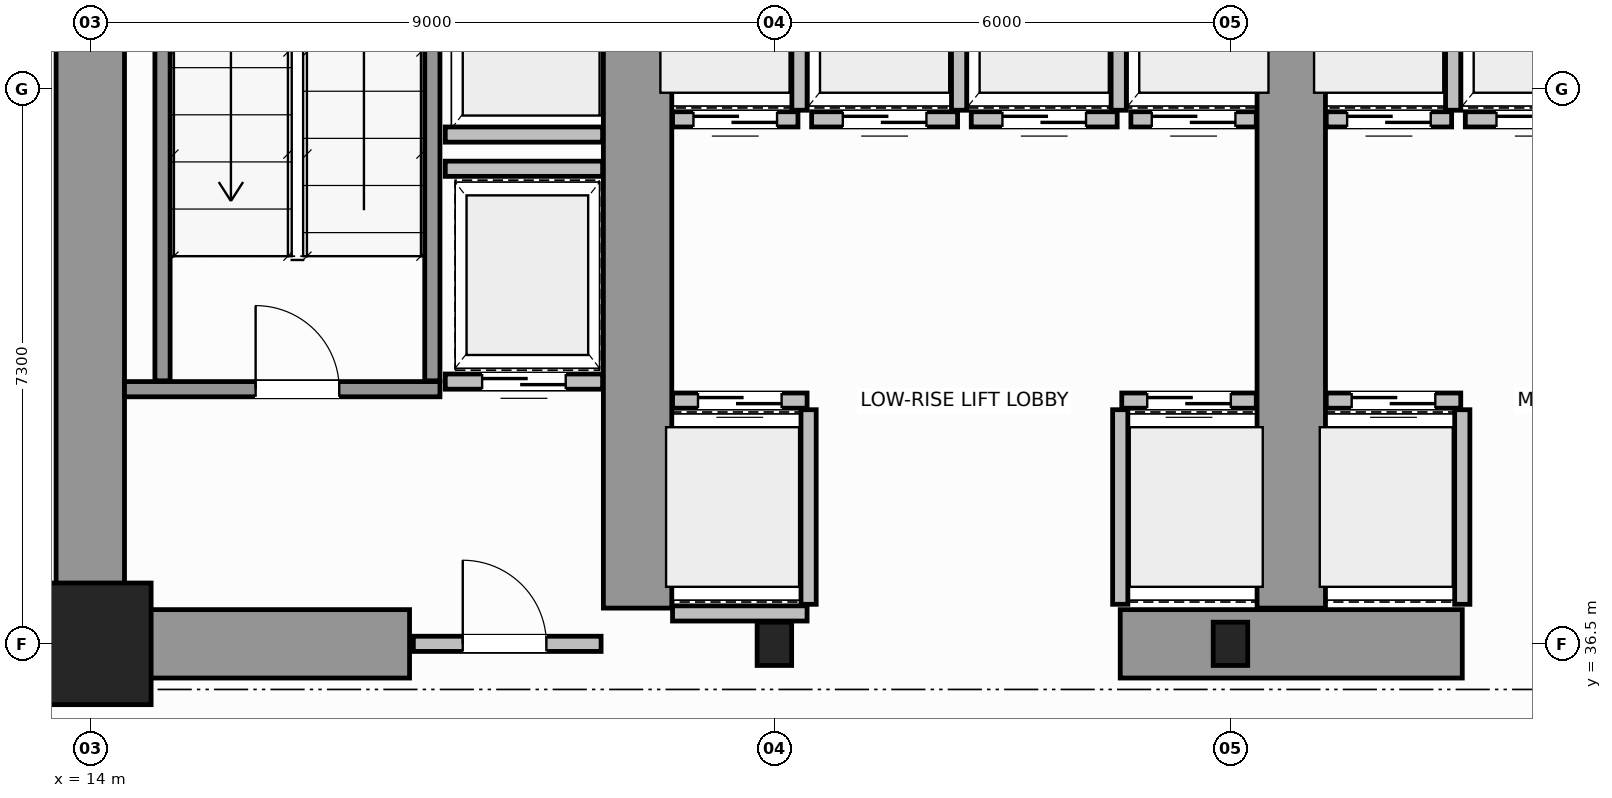
"""IFC4 building model, lengths in metres.
Left out: names, types, materials, properties, quantities, classifications, styles, units other than length and angle.
Written with IfcOpenShell. Run it as: python <this file> out.ifc"""

import sys

from ifc_helpers import new_model, si_unit, direction, frame, frame_2d, origin, origin_2d, place, context, subcontext, project, spatial, rectangle, i_section, extrude, source, transform, mapped, element, fill, save


model = new_model("IFC4")
c1 = context("Model", 3, precision=1e-05, world=origin(), true_north=direction((0.0, 1.0)))
c2 = subcontext(c1, "Body", "Model", "MODEL_VIEW")
j1 = project(units=[si_unit("LENGTHUNIT", "METRE"), si_unit("PLANEANGLEUNIT", "RADIAN")], contexts=[c1])
p1 = place(None, origin())
s1 = spatial("IfcSite", under=j1, at=p1, CompositionType="ELEMENT")
p2 = place(p1, origin())
s2 = spatial("IfcBuilding", under=s1, at=p2, CompositionType="ELEMENT")
p3 = place(p2, frame((0.0, 0.0, 5.6)))
s3 = spatial("IfcBuildingStorey", under=s2, at=p3, CompositionType="ELEMENT", Elevation=5.6)
m1 = source(origin(), c2, "Body", "SweptSolid", [
    extrude(rectangle(XDim=1.6, YDim=1.6, at=origin_2d()), origin(), (0.0, 0.0, 1.0), 4.4),
])
p4 = place(p3, frame((14.0, 36.5, 0.0), z_axis=(0.0, 0.0, 1.0), x_axis=(1.0, 0.0, 0.0)))
e1 = element("IfcColumn", 1, at=p4, inside=s3, PredefinedType="COLUMN", context=c2, shape_type="MappedRepresentation", body=[
    mapped(m1, transform((0.0, 0.0, 0.0), scale=1.0)),
])
m2 = source(origin(), c2, "Body", "SweptSolid", [
    extrude(i_section(OverallWidth=0.454, OverallDepth=0.569, WebThickness=0.078, FlangeThickness=0.08, FilletRadius=0.015, at=origin_2d()), origin(), (0.0, 0.0, 1.0), 4.4),
])
for number, where, z_axis, x_axis in (
    (2, (23.0, 36.5, 0.0), (0.0, 0.0, 1.0), (1.0, 0.0, 0.0)),
    (3, (29.0, 36.5, 0.0), (0.0, 0.0, 1.0), (1.0, 0.0, 0.0)),
):
    element("IfcColumn", number, at=place(p3, frame(where, z_axis=z_axis, x_axis=x_axis)), inside=s3, PredefinedType="COLUMN", context=c2, shape_type="MappedRepresentation", body=[
        mapped(m2, transform((0.0, 0.0, 0.0), scale=1.0)),
    ])
p5 = place(p3, frame((14.0, 36.5, 0.0), z_axis=(0.0, 0.0, 1.0), x_axis=(0.0, 1.0, 0.0)))
e4 = element("IfcWall", 4, at=p5, inside=s3, PredefinedType="SHEAR", context=c2, shape_type="SweptSolid", body=[
    extrude(rectangle(XDim=14.5, YDim=0.9, at=frame_2d((7.25, 0.0))), origin(), (0.0, 0.0, 1.0), 4.4),
])
p6 = place(p3, frame((14.47, 36.5, 0.0), z_axis=(0.0, 0.0, 1.0), x_axis=(1.0, 0.0, 0.0)))
e5 = element("IfcWall", 5, at=p6, inside=s3, PredefinedType="SHEAR", context=c2, shape_type="SweptSolid", body=[
    extrude(rectangle(XDim=3.73, YDim=0.9, at=frame_2d((1.865, 0.0))), origin(), (0.0, 0.0, 1.0), 2.92),
])
p7 = place(p3, frame((27.55, 36.5, 0.0), z_axis=(0.0, 0.0, 1.0), x_axis=(1.0, 0.0, 0.0)))
e6 = element("IfcWall", 6, at=p7, inside=s3, PredefinedType="SHEAR", context=c2, shape_type="SweptSolid", body=[
    extrude(rectangle(XDim=4.5, YDim=0.9, at=frame_2d((2.25, 0.0))), origin(), (0.0, 0.0, 1.0), 4.4),
])
for number, where, z_axis, x_axis in (
    (7, (21.2, 36.97, 0.0), (0.0, 0.0, 1.0), (0.0, 1.0, 0.0)),
    (8, (29.8, 36.97, 0.0), (0.0, 0.0, 1.0), (0.0, 1.0, 0.0)),
):
    element("IfcWall", number, at=place(p3, frame(where, z_axis=z_axis, x_axis=x_axis)), inside=s3, PredefinedType="SHEAR", context=c2, shape_type="SweptSolid", body=[
        extrude(rectangle(XDim=9.23, YDim=0.9, at=frame_2d((4.615, 0.0))), origin(), (0.0, 0.0, 1.0), 4.4),
    ])
p8 = place(p3, frame((14.45, 39.85, 0.0), z_axis=(0.0, 0.0, 1.0), x_axis=(1.0, 0.0, 0.0)))
e9 = element("IfcWall", 9, at=p8, inside=s3, PredefinedType="SOLIDWALL", context=c2, shape_type="SweptSolid", body=[
    extrude(rectangle(XDim=4.15, YDim=0.2, at=frame_2d((2.075, 0.0))), origin(), (0.0, 0.0, 1.0), 4.4),
])
p9 = place(p8, frame((1.725, 0.0, 0.0)))
e10 = element("IfcOpeningElement", 10, at=p9, cuts=e9, PredefinedType="OPENING", context=c2, shape_type="SweptSolid", body=[
    extrude(rectangle(XDim=1.1, YDim=2.15, at=frame_2d((0.55, 1.075))), frame((0.0, 0.11, 0.0), z_axis=(0.0, -1.0, 0.0), x_axis=(1.0, 0.0, 0.0)), (0.0, 0.0, 1.0), 0.22),
])
for number, where, z_axis, x_axis in (
    (11, (14.95, 39.96, 0.0), (0.0, 0.0, 1.0), (0.0, 1.0, 0.0)),
    (12, (18.5, 39.96, 0.0), (0.0, 0.0, 1.0), (0.0, 1.0, 0.0)),
):
    element("IfcWall", number, at=place(p3, frame(where, z_axis=z_axis, x_axis=x_axis)), inside=s3, PredefinedType="SOLIDWALL", context=c2, shape_type="SweptSolid", body=[
        extrude(rectangle(XDim=9.93, YDim=0.2, at=frame_2d((4.965, 0.0))), origin(), (0.0, 0.0, 1.0), 4.4),
    ])
p10 = place(p3, frame((18.25, 36.5, 0.0), z_axis=(0.0, 0.0, 1.0), x_axis=(1.0, 0.0, 0.0)))
e13 = element("IfcWall", 13, at=p10, inside=s3, PredefinedType="SOLIDWALL", context=c2, shape_type="SweptSolid", body=[
    extrude(rectangle(XDim=2.47, YDim=0.2, at=frame_2d((1.235, 0.0))), origin(), (0.0, 0.0, 1.0), 2.91),
])
p11 = place(p10, frame((0.65, 0.0, 0.0)))
e14 = element("IfcOpeningElement", 14, at=p11, cuts=e13, PredefinedType="OPENING", context=c2, shape_type="SweptSolid", body=[
    extrude(rectangle(XDim=1.1, YDim=2.15, at=frame_2d((0.55, 1.075))), frame((0.0, 0.11, 0.0), z_axis=(0.0, -1.0, 0.0), x_axis=(1.0, 0.0, 0.0)), (0.0, 0.0, 1.0), 0.22),
])
p12 = place(p3, frame((21.66, 39.7, 0.0), z_axis=(0.0, 0.0, 1.0), x_axis=(1.0, 0.0, 0.0)))
e15 = element("IfcWall", 15, at=p12, inside=s3, PredefinedType="SOLIDWALL", context=c2, shape_type="SweptSolid", body=[
    extrude(rectangle(XDim=1.77, YDim=0.2, at=frame_2d((0.885, 0.0))), origin(), (0.0, 0.0, 1.0), 4.12),
])
p13 = place(p12, frame((0.335, 0.0, 0.0)))
e16 = element("IfcOpeningElement", 16, at=p13, cuts=e15, PredefinedType="OPENING", context=c2, shape_type="SweptSolid", body=[
    extrude(rectangle(XDim=1.1, YDim=2.15, at=frame_2d((0.55, 1.075))), frame((0.0, 0.11, 0.0), z_axis=(0.0, -1.0, 0.0), x_axis=(1.0, 0.0, 0.0)), (0.0, 0.0, 1.0), 0.22),
])
p14 = place(p3, frame((21.66, 36.9, 0.0), z_axis=(0.0, 0.0, 1.0), x_axis=(1.0, 0.0, 0.0)))
e17 = element("IfcWall", 17, at=p14, inside=s3, PredefinedType="SOLIDWALL", context=c2, shape_type="SweptSolid", body=[
    extrude(rectangle(XDim=1.77, YDim=0.2, at=frame_2d((0.885, 0.0))), origin(), (0.0, 0.0, 1.0), 2.91),
])
p15 = place(p3, frame((23.45, 37.02, 0.0), z_axis=(0.0, 0.0, 1.0), x_axis=(0.0, 1.0, 0.0)))
e18 = element("IfcWall", 18, at=p15, inside=s3, PredefinedType="SOLIDWALL", context=c2, shape_type="SweptSolid", body=[
    extrude(rectangle(XDim=2.56, YDim=0.2, at=frame_2d((1.28, 0.0))), origin(), (0.0, 0.0, 1.0), 4.12),
])
p16 = place(p3, frame((27.57, 39.7, 0.0), z_axis=(0.0, 0.0, 1.0), x_axis=(1.0, 0.0, 0.0)))
e19 = element("IfcWall", 19, at=p16, inside=s3, PredefinedType="SOLIDWALL", context=c2, shape_type="SweptSolid", body=[
    extrude(rectangle(XDim=1.77, YDim=0.2, at=frame_2d((0.885, 0.0))), origin(), (0.0, 0.0, 1.0), 4.12),
])
p17 = place(p16, frame((0.335, 0.0, 0.0)))
e20 = element("IfcOpeningElement", 20, at=p17, cuts=e19, PredefinedType="OPENING", context=c2, shape_type="SweptSolid", body=[
    extrude(rectangle(XDim=1.1, YDim=2.15, at=frame_2d((0.55, 1.075))), frame((0.0, 0.11, 0.0), z_axis=(0.0, -1.0, 0.0), x_axis=(1.0, 0.0, 0.0)), (0.0, 0.0, 1.0), 0.22),
])
p18 = place(p3, frame((27.55, 37.02, 0.0), z_axis=(0.0, 0.0, 1.0), x_axis=(0.0, 1.0, 0.0)))
e21 = element("IfcWall", 21, at=p18, inside=s3, PredefinedType="SOLIDWALL", context=c2, shape_type="SweptSolid", body=[
    extrude(rectangle(XDim=2.56, YDim=0.2, at=frame_2d((1.28, 0.0))), origin(), (0.0, 0.0, 1.0), 4.12),
])
p19 = place(p3, frame((21.66, 43.4, 0.0), z_axis=(0.0, 0.0, 1.0), x_axis=(1.0, 0.0, 0.0)))
e22 = element("IfcWall", 22, at=p19, inside=s3, PredefinedType="SOLIDWALL", context=c2, shape_type="SweptSolid", body=[
    extrude(rectangle(XDim=1.65, YDim=0.2, at=frame_2d((0.825, 0.0))), origin(), (0.0, 0.0, 1.0), 4.12),
])
p20 = place(p19, frame((0.275, 0.0, 0.0)))
e23 = element("IfcOpeningElement", 23, at=p20, cuts=e22, PredefinedType="OPENING", context=c2, shape_type="SweptSolid", body=[
    extrude(rectangle(XDim=1.1, YDim=2.15, at=frame_2d((0.55, 1.075))), frame((0.0, 0.11, 0.0), z_axis=(0.0, -1.0, 0.0), x_axis=(1.0, 0.0, 0.0)), (0.0, 0.0, 1.0), 0.22),
])
p21 = place(p3, frame((23.33, 43.52, 0.0), z_axis=(0.0, 0.0, 1.0), x_axis=(0.0, 1.0, 0.0)))
e24 = element("IfcWall", 24, at=p21, inside=s3, PredefinedType="SOLIDWALL", context=c2, shape_type="SweptSolid", body=[
    extrude(rectangle(XDim=2.56, YDim=0.2, at=frame_2d((1.28, 0.0))), origin(), (0.0, 0.0, 1.0), 4.12),
])
p22 = place(p3, frame((23.49, 43.4, 0.0), z_axis=(0.0, 0.0, 1.0), x_axis=(1.0, 0.0, 0.0)))
e25 = element("IfcWall", 25, at=p22, inside=s3, PredefinedType="SOLIDWALL", context=c2, shape_type="SweptSolid", body=[
    extrude(rectangle(XDim=1.92, YDim=0.2, at=frame_2d((0.96, 0.0))), origin(), (0.0, 0.0, 1.0), 4.12),
])
p23 = place(p22, frame((0.41, 0.0, 0.0)))
e26 = element("IfcOpeningElement", 26, at=p23, cuts=e25, PredefinedType="OPENING", context=c2, shape_type="SweptSolid", body=[
    extrude(rectangle(XDim=1.1, YDim=2.15, at=frame_2d((0.55, 1.075))), frame((0.0, 0.11, 0.0), z_axis=(0.0, -1.0, 0.0), x_axis=(1.0, 0.0, 0.0)), (0.0, 0.0, 1.0), 0.22),
])
p24 = place(p3, frame((25.43, 43.52, 0.0), z_axis=(0.0, 0.0, 1.0), x_axis=(0.0, 1.0, 0.0)))
e27 = element("IfcWall", 27, at=p24, inside=s3, PredefinedType="SOLIDWALL", context=c2, shape_type="SweptSolid", body=[
    extrude(rectangle(XDim=2.56, YDim=0.2, at=frame_2d((1.28, 0.0))), origin(), (0.0, 0.0, 1.0), 4.12),
])
p25 = place(p3, frame((25.59, 43.4, 0.0), z_axis=(0.0, 0.0, 1.0), x_axis=(1.0, 0.0, 0.0)))
e28 = element("IfcWall", 28, at=p25, inside=s3, PredefinedType="SOLIDWALL", context=c2, shape_type="SweptSolid", body=[
    extrude(rectangle(XDim=1.92, YDim=0.2, at=frame_2d((0.96, 0.0))), origin(), (0.0, 0.0, 1.0), 4.12),
])
p26 = place(p25, frame((0.41, 0.0, 0.0)))
e29 = element("IfcOpeningElement", 29, at=p26, cuts=e28, PredefinedType="OPENING", context=c2, shape_type="SweptSolid", body=[
    extrude(rectangle(XDim=1.1, YDim=2.15, at=frame_2d((0.55, 1.075))), frame((0.0, 0.11, 0.0), z_axis=(0.0, -1.0, 0.0), x_axis=(1.0, 0.0, 0.0)), (0.0, 0.0, 1.0), 0.22),
])
p27 = place(p3, frame((27.53, 43.52, 0.0), z_axis=(0.0, 0.0, 1.0), x_axis=(0.0, 1.0, 0.0)))
e30 = element("IfcWall", 30, at=p27, inside=s3, PredefinedType="SOLIDWALL", context=c2, shape_type="SweptSolid", body=[
    extrude(rectangle(XDim=2.56, YDim=0.2, at=frame_2d((1.28, 0.0))), origin(), (0.0, 0.0, 1.0), 4.12),
])
p28 = place(p3, frame((27.69, 43.4, 0.0), z_axis=(0.0, 0.0, 1.0), x_axis=(1.0, 0.0, 0.0)))
e31 = element("IfcWall", 31, at=p28, inside=s3, PredefinedType="SOLIDWALL", context=c2, shape_type="SweptSolid", body=[
    extrude(rectangle(XDim=1.65, YDim=0.2, at=frame_2d((0.825, 0.0))), origin(), (0.0, 0.0, 1.0), 4.12),
])
p29 = place(p28, frame((0.275, 0.0, 0.0)))
e32 = element("IfcOpeningElement", 32, at=p29, cuts=e31, PredefinedType="OPENING", context=c2, shape_type="SweptSolid", body=[
    extrude(rectangle(XDim=1.1, YDim=2.15, at=frame_2d((0.55, 1.075))), frame((0.0, 0.11, 0.0), z_axis=(0.0, -1.0, 0.0), x_axis=(1.0, 0.0, 0.0)), (0.0, 0.0, 1.0), 0.22),
])
p30 = place(p3, frame((30.26, 39.7, 0.0), z_axis=(0.0, 0.0, 1.0), x_axis=(1.0, 0.0, 0.0)))
e33 = element("IfcWall", 33, at=p30, inside=s3, PredefinedType="SOLIDWALL", context=c2, shape_type="SweptSolid", body=[
    extrude(rectangle(XDim=1.77, YDim=0.2, at=frame_2d((0.885, 0.0))), origin(), (0.0, 0.0, 1.0), 4.12),
])
p31 = place(p30, frame((0.335, 0.0, 0.0)))
e34 = element("IfcOpeningElement", 34, at=p31, cuts=e33, PredefinedType="OPENING", context=c2, shape_type="SweptSolid", body=[
    extrude(rectangle(XDim=1.1, YDim=2.15, at=frame_2d((0.55, 1.075))), frame((0.0, 0.11, 0.0), z_axis=(0.0, -1.0, 0.0), x_axis=(1.0, 0.0, 0.0)), (0.0, 0.0, 1.0), 0.22),
])
p32 = place(p3, frame((32.05, 37.02, 0.0), z_axis=(0.0, 0.0, 1.0), x_axis=(0.0, 1.0, 0.0)))
e35 = element("IfcWall", 35, at=p32, inside=s3, PredefinedType="SOLIDWALL", context=c2, shape_type="SweptSolid", body=[
    extrude(rectangle(XDim=2.56, YDim=0.2, at=frame_2d((1.28, 0.0))), origin(), (0.0, 0.0, 1.0), 4.12),
])
p33 = place(p3, frame((30.26, 43.4, 0.0), z_axis=(0.0, 0.0, 1.0), x_axis=(1.0, 0.0, 0.0)))
e36 = element("IfcWall", 36, at=p33, inside=s3, PredefinedType="SOLIDWALL", context=c2, shape_type="SweptSolid", body=[
    extrude(rectangle(XDim=1.65, YDim=0.2, at=frame_2d((0.825, 0.0))), origin(), (0.0, 0.0, 1.0), 4.12),
])
p34 = place(p33, frame((0.275, 0.0, 0.0)))
e37 = element("IfcOpeningElement", 37, at=p34, cuts=e36, PredefinedType="OPENING", context=c2, shape_type="SweptSolid", body=[
    extrude(rectangle(XDim=1.1, YDim=2.15, at=frame_2d((0.55, 1.075))), frame((0.0, 0.11, 0.0), z_axis=(0.0, -1.0, 0.0), x_axis=(1.0, 0.0, 0.0)), (0.0, 0.0, 1.0), 0.22),
])
p35 = place(p3, frame((31.93, 43.52, 0.0), z_axis=(0.0, 0.0, 1.0), x_axis=(0.0, 1.0, 0.0)))
e38 = element("IfcWall", 38, at=p35, inside=s3, PredefinedType="SOLIDWALL", context=c2, shape_type="SweptSolid", body=[
    extrude(rectangle(XDim=2.56, YDim=0.2, at=frame_2d((1.28, 0.0))), origin(), (0.0, 0.0, 1.0), 4.12),
])
p36 = place(p3, frame((32.09, 43.4, 0.0), z_axis=(0.0, 0.0, 1.0), x_axis=(1.0, 0.0, 0.0)))
e39 = element("IfcWall", 39, at=p36, inside=s3, PredefinedType="SOLIDWALL", context=c2, shape_type="SweptSolid", body=[
    extrude(rectangle(XDim=1.92, YDim=0.2, at=frame_2d((0.96, 0.0))), origin(), (0.0, 0.0, 1.0), 4.12),
])
p37 = place(p36, frame((0.41, 0.0, 0.0)))
e40 = element("IfcOpeningElement", 40, at=p37, cuts=e39, PredefinedType="OPENING", context=c2, shape_type="SweptSolid", body=[
    extrude(rectangle(XDim=1.1, YDim=2.15, at=frame_2d((0.55, 1.075))), frame((0.0, 0.11, 0.0), z_axis=(0.0, -1.0, 0.0), x_axis=(1.0, 0.0, 0.0)), (0.0, 0.0, 1.0), 0.22),
])
p38 = place(p3, frame((18.67, 43.2, 0.0), z_axis=(0.0, 0.0, 1.0), x_axis=(1.0, 0.0, 0.0)))
e41 = element("IfcWall", 41, at=p38, inside=s3, PredefinedType="SOLIDWALL", context=c2, shape_type="SweptSolid", body=[
    extrude(rectangle(XDim=2.07, YDim=0.2, at=frame_2d((1.035, 0.0))), origin(), (0.0, 0.0, 1.0), 4.12),
])
p39 = place(p3, frame((18.67, 39.95, 0.0), z_axis=(0.0, 0.0, 1.0), x_axis=(1.0, 0.0, 0.0)))
e42 = element("IfcWall", 42, at=p39, inside=s3, PredefinedType="SOLIDWALL", context=c2, shape_type="SweptSolid", body=[
    extrude(rectangle(XDim=2.07, YDim=0.2, at=frame_2d((1.035, 0.0))), origin(), (0.0, 0.0, 1.0), 4.12),
])
p40 = place(p39, frame((0.485, 0.0, 0.0)))
e43 = element("IfcOpeningElement", 43, at=p40, cuts=e42, PredefinedType="OPENING", context=c2, shape_type="SweptSolid", body=[
    extrude(rectangle(XDim=1.1, YDim=2.15, at=frame_2d((0.55, 1.075))), frame((0.0, 0.11, 0.0), z_axis=(0.0, -1.0, 0.0), x_axis=(1.0, 0.0, 0.0)), (0.0, 0.0, 1.0), 0.22),
])
p41 = place(p3, frame((18.67, 42.75, 0.0), z_axis=(0.0, 0.0, 1.0), x_axis=(1.0, 0.0, 0.0)))
e44 = element("IfcWall", 44, at=p41, inside=s3, PredefinedType="SOLIDWALL", context=c2, shape_type="SweptSolid", body=[
    extrude(rectangle(XDim=2.07, YDim=0.2, at=frame_2d((1.035, 0.0))), origin(), (0.0, 0.0, 1.0), 4.12),
])
m3 = source(origin(), c2, "Body", "SweptSolid", [
    extrude(rectangle(XDim=1.1, YDim=2.15, at=frame_2d((0.55, 1.075))), frame((0.0, 0.025, 0.0), z_axis=(0.0, -1.0, 0.0), x_axis=(1.0, 0.0, 0.0)), (0.0, 0.0, 1.0), 0.05),
])
p42 = place(p9, origin())
e45 = element("IfcDoor", 45, at=p42, inside=s3, OperationType="SINGLE_SWING_LEFT", PredefinedType="DOOR", context=c2, shape_type="MappedRepresentation", body=[
    mapped(m3, transform((0.0, 0.0, 0.0), scale=1.0)),
])
fill(e10, e45)
p43 = place(p11, origin())
e46 = element("IfcDoor", 46, at=p43, inside=s3, OperationType="SINGLE_SWING_RIGHT", PredefinedType="DOOR", context=c2, shape_type="MappedRepresentation", body=[
    mapped(m3, transform((0.0, 0.0, 0.0), scale=1.0)),
])
fill(e14, e46)
p44 = place(p13, origin())
e47 = element("IfcDoor", 47, at=p44, inside=s3, OperationType="DOUBLE_DOOR_SLIDING", PredefinedType="DOOR", context=c2, shape_type="MappedRepresentation", body=[
    mapped(m3, transform((0.0, 0.0, 0.0), scale=1.0)),
])
fill(e16, e47)
p45 = place(p17, origin())
e48 = element("IfcDoor", 48, at=p45, inside=s3, OperationType="DOUBLE_DOOR_SLIDING", PredefinedType="DOOR", context=c2, shape_type="MappedRepresentation", body=[
    mapped(m3, transform((0.0, 0.0, 0.0), scale=1.0)),
])
fill(e20, e48)
p46 = place(p20, origin())
e49 = element("IfcDoor", 49, at=p46, inside=s3, OperationType="DOUBLE_DOOR_SLIDING", PredefinedType="DOOR", context=c2, shape_type="MappedRepresentation", body=[
    mapped(m3, transform((0.0, 0.0, 0.0), scale=1.0)),
])
fill(e23, e49)
p47 = place(p23, origin())
e50 = element("IfcDoor", 50, at=p47, inside=s3, OperationType="DOUBLE_DOOR_SLIDING", PredefinedType="DOOR", context=c2, shape_type="MappedRepresentation", body=[
    mapped(m3, transform((0.0, 0.0, 0.0), scale=1.0)),
])
fill(e26, e50)
p48 = place(p26, origin())
e51 = element("IfcDoor", 51, at=p48, inside=s3, OperationType="DOUBLE_DOOR_SLIDING", PredefinedType="DOOR", context=c2, shape_type="MappedRepresentation", body=[
    mapped(m3, transform((0.0, 0.0, 0.0), scale=1.0)),
])
fill(e29, e51)
p49 = place(p29, origin())
e52 = element("IfcDoor", 52, at=p49, inside=s3, OperationType="DOUBLE_DOOR_SLIDING", PredefinedType="DOOR", context=c2, shape_type="MappedRepresentation", body=[
    mapped(m3, transform((0.0, 0.0, 0.0), scale=1.0)),
])
fill(e32, e52)
p50 = place(p31, origin())
e53 = element("IfcDoor", 53, at=p50, inside=s3, OperationType="DOUBLE_DOOR_SLIDING", PredefinedType="DOOR", context=c2, shape_type="MappedRepresentation", body=[
    mapped(m3, transform((0.0, 0.0, 0.0), scale=1.0)),
])
fill(e34, e53)
p51 = place(p34, origin())
e54 = element("IfcDoor", 54, at=p51, inside=s3, OperationType="DOUBLE_DOOR_SLIDING", PredefinedType="DOOR", context=c2, shape_type="MappedRepresentation", body=[
    mapped(m3, transform((0.0, 0.0, 0.0), scale=1.0)),
])
fill(e37, e54)
p52 = place(p37, origin())
e55 = element("IfcDoor", 55, at=p52, inside=s3, OperationType="DOUBLE_DOOR_SLIDING", PredefinedType="DOOR", context=c2, shape_type="MappedRepresentation", body=[
    mapped(m3, transform((0.0, 0.0, 0.0), scale=1.0)),
])
fill(e40, e55)
p53 = place(p40, origin())
e56 = element("IfcDoor", 56, at=p53, inside=s3, OperationType="DOUBLE_DOOR_SLIDING", PredefinedType="DOOR", context=c2, shape_type="MappedRepresentation", body=[
    mapped(m3, transform((0.0, 0.0, 0.0), scale=1.0)),
])
fill(e43, e56)
save(model, sys.argv[1])
